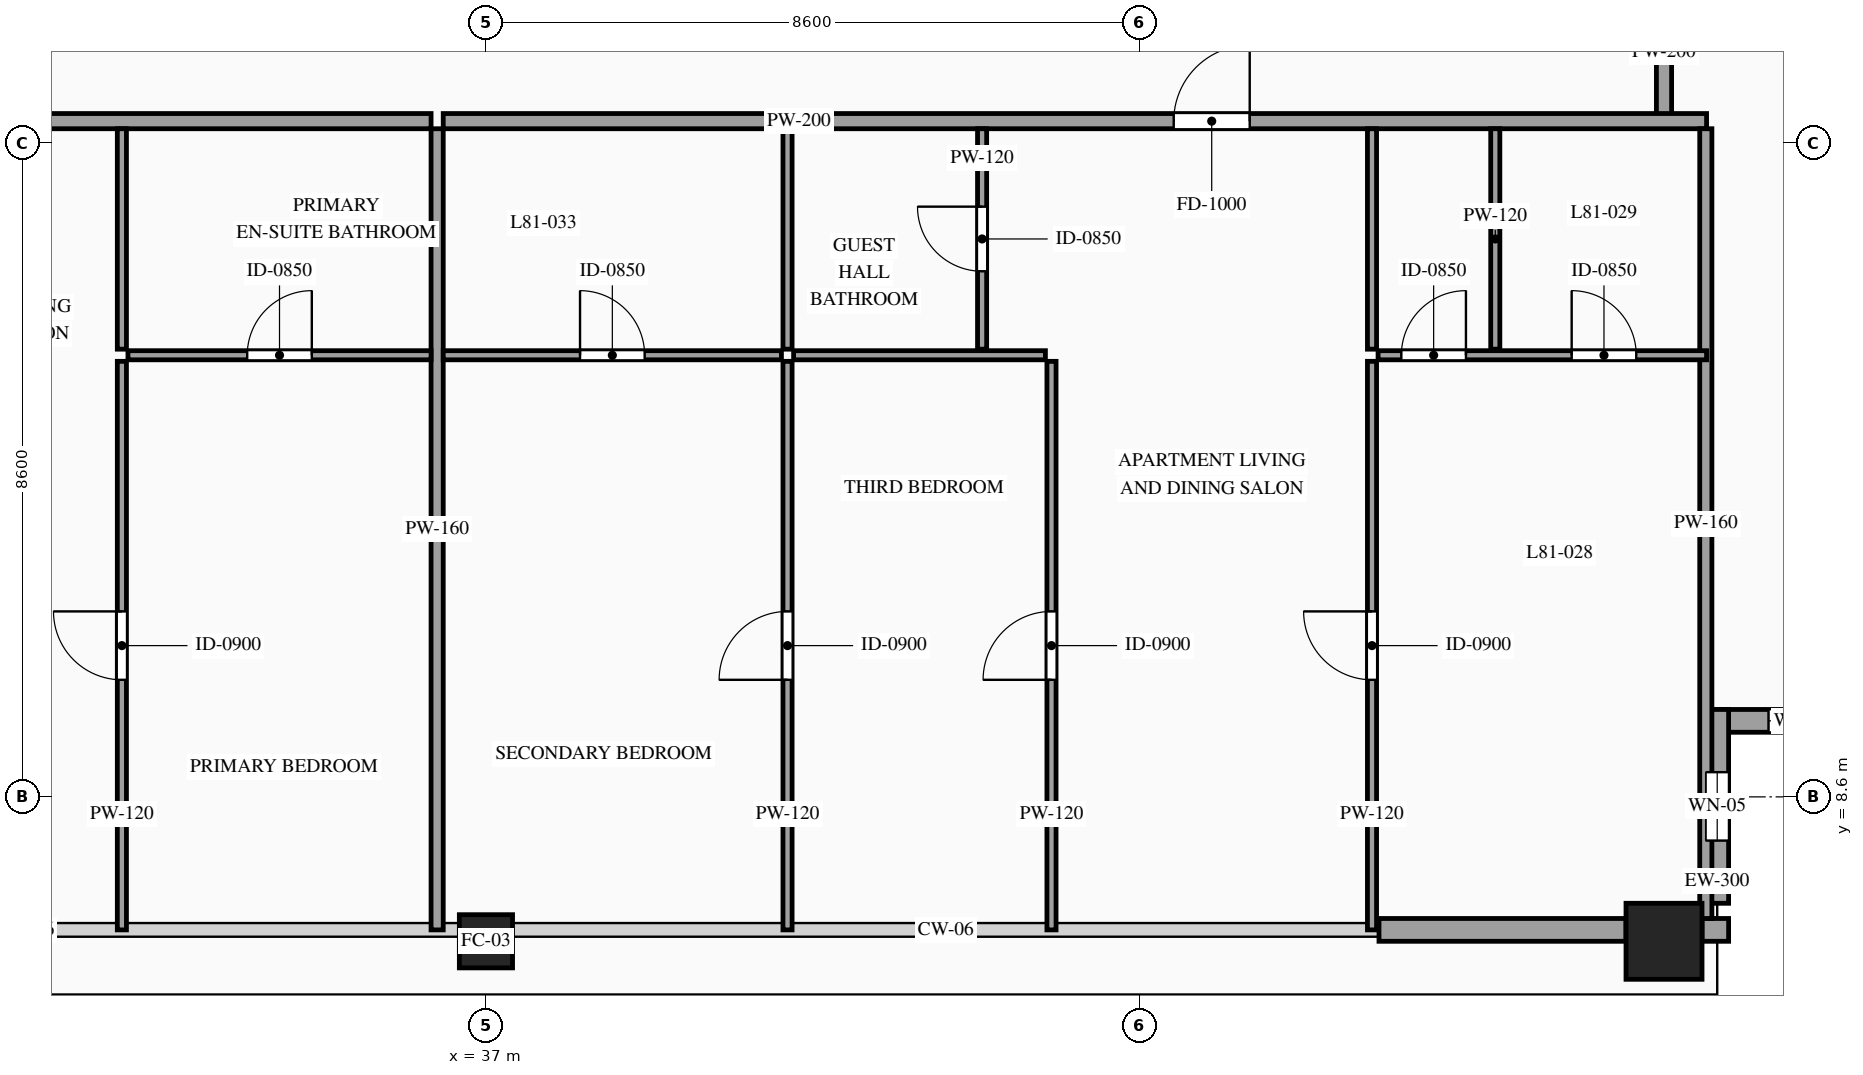
"""IFC4 building model, lengths in metres.
Left out: names, types, materials, properties, quantities, classifications, styles, units other than length and angle.
Written with IfcOpenShell. Run it as: python <this file> out.ifc"""

import sys

from ifc_helpers import new_model, si_unit, direction, frame, frame_2d, origin, origin_2d, place, context, subcontext, project, spatial, rectangle, hollow_rectangle, extrude, source, transform, mapped, element, fill, save


model = new_model("IFC4")
c1 = context("Model", 3, precision=1e-05, world=origin(), true_north=direction((0.0, 1.0)))
c2 = subcontext(c1, "Body", "Model", "MODEL_VIEW")
j1 = project(units=[si_unit("LENGTHUNIT", "METRE"), si_unit("PLANEANGLEUNIT", "RADIAN")], contexts=[c1])
p1 = place(None, origin())
s1 = spatial("IfcSite", under=j1, at=p1, CompositionType="ELEMENT")
p2 = place(p1, origin())
s2 = spatial("IfcBuilding", under=s1, at=p2, CompositionType="ELEMENT")
p3 = place(p2, frame((0.0, 0.0, 303.1)))
s3 = spatial("IfcBuildingStorey", under=s2, at=p3, CompositionType="ELEMENT", Elevation=303.1)
m1 = source(origin(), c2, "Body", "SweptSolid", [
    extrude(hollow_rectangle(XDim=0.7, YDim=0.7, WallThickness=0.032, at=origin_2d()), origin(), (0.0, 0.0, 1.0), 3.5),
])
p4 = place(p3, frame((37.0, 6.7, 0.0), z_axis=(0.0, 0.0, 1.0), x_axis=(1.0, 0.0, 0.0)))
e1 = element("IfcColumn", 1, at=p4, inside=s3, PredefinedType="COLUMN", context=c2, shape_type="MappedRepresentation", body=[
    mapped(m1, transform((0.0, 0.0, 0.0), scale=1.0)),
])
m2 = source(origin(), c2, "Body", "SweptSolid", [
    extrude(hollow_rectangle(XDim=1.0, YDim=1.0, WallThickness=0.048, at=origin_2d()), origin(), (0.0, 0.0, 1.0), 3.5),
])
p5 = place(p3, frame((52.5, 6.7, 0.0), z_axis=(0.0, 0.0, 1.0), x_axis=(1.0, 0.0, 0.0)))
e2 = element("IfcColumn", 2, at=p5, inside=s3, PredefinedType="COLUMN", context=c2, shape_type="MappedRepresentation", body=[
    mapped(m2, transform((0.0, 0.0, 0.0), scale=1.0)),
])
p6 = place(p3, frame((53.05, 9.6, 0.0), z_axis=(0.0, 0.0, 1.0), x_axis=(1.0, 0.0, 0.0)))
e3 = element("IfcWall", 3, at=p6, inside=s3, PredefinedType="SOLIDWALL", context=c2, shape_type="SweptSolid", body=[
    extrude(rectangle(XDim=2.55, YDim=0.3, at=frame_2d((1.275, 0.0))), origin(), (0.0, 0.0, 1.0), 3.22),
])
p7 = place(p6, frame((0.825, 0.0, 0.75)))
e4 = element("IfcOpeningElement", 4, at=p7, cuts=e3, PredefinedType="OPENING", context=c2, shape_type="SweptSolid", body=[
    extrude(rectangle(XDim=0.9, YDim=1.5, at=frame_2d((0.45, 0.75))), frame((0.0, 0.165, 0.0), z_axis=(0.0, -1.0, 0.0), x_axis=(1.0, 0.0, 0.0)), (0.0, 0.0, 1.0), 0.33),
])
p8 = place(p3, frame((53.2, 7.2, 0.0), z_axis=(0.0, 0.0, 1.0), x_axis=(0.0, 1.0, 0.0)))
e5 = element("IfcWall", 5, at=p8, inside=s3, PredefinedType="SOLIDWALL", context=c2, shape_type="SweptSolid", body=[
    extrude(rectangle(XDim=2.55, YDim=0.3, at=frame_2d((1.275, 0.0))), origin(), (0.0, 0.0, 1.0), 3.22),
])
p9 = place(p8, frame((0.825, 0.0, 0.75)))
e6 = element("IfcOpeningElement", 6, at=p9, cuts=e5, PredefinedType="OPENING", context=c2, shape_type="SweptSolid", body=[
    extrude(rectangle(XDim=0.9, YDim=1.5, at=frame_2d((0.45, 0.75))), frame((0.0, 0.165, 0.0), z_axis=(0.0, -1.0, 0.0), x_axis=(1.0, 0.0, 0.0)), (0.0, 0.0, 1.0), 0.33),
])
m3 = source(origin(), c2, "Body", "SweptSolid", [
    extrude(rectangle(XDim=0.35, YDim=0.3, at=frame_2d((0.175, 0.0))), origin(), (0.0, 0.0, 1.0), 3.22),
])
p10 = place(p3, frame((53.0, 6.85, 0.0), z_axis=(0.0, 0.0, 1.0), x_axis=(1.0, 0.0, 0.0)))
e7 = element("IfcWall", 7, at=p10, inside=s3, PredefinedType="SOLIDWALL", context=c2, shape_type="MappedRepresentation", body=[
    mapped(m3, transform((0.0, 0.0, 0.0), scale=1.0)),
])
m4 = source(origin(), c2, "Body", "SweptSolid", [
    extrude(rectangle(XDim=3.25, YDim=0.3, at=frame_2d((1.625, 0.0))), origin(), (0.0, 0.0, 1.0), 2.825),
])
p11 = place(p3, frame((48.75, 6.85, 0.0), z_axis=(0.0, 0.0, 1.0), x_axis=(1.0, 0.0, 0.0)))
e8 = element("IfcWall", 8, at=p11, inside=s3, PredefinedType="SOLIDWALL", context=c2, shape_type="MappedRepresentation", body=[
    mapped(m4, transform((0.0, 0.0, 0.0), scale=1.0)),
])
m5 = source(origin(), c2, "Body", "SweptSolid", [
    extrude(rectangle(XDim=1.7, YDim=0.2, at=frame_2d((0.85, 0.0))), origin(), (0.0, 0.0, 1.0), 3.22),
])
p12 = place(p3, frame((52.5, 17.55, 0.0), z_axis=(0.0, 0.0, 1.0), x_axis=(0.0, 1.0, 0.0)))
e9 = element("IfcWall", 9, at=p12, inside=s3, PredefinedType="PARTITIONING", context=c2, shape_type="MappedRepresentation", body=[
    mapped(m5, transform((0.0, 0.0, 0.0), scale=1.0)),
])
p13 = place(p3, frame((20.94, 17.49, 0.0), z_axis=(0.0, 0.0, 1.0), x_axis=(1.0, 0.0, 0.0)))
e10 = element("IfcWall", 10, at=p13, inside=s3, PredefinedType="PARTITIONING", context=c2, shape_type="SweptSolid", body=[
    extrude(rectangle(XDim=15.338, YDim=0.2, at=frame_2d((7.669, 0.0))), origin(), (0.0, 0.0, 1.0), 3.22),
])
p14 = place(p13, frame((8.927, 0.0, 0.0)))
e11 = element("IfcOpeningElement", 11, at=p14, cuts=e10, PredefinedType="OPENING", context=c2, shape_type="SweptSolid", body=[
    extrude(rectangle(XDim=1.0, YDim=2.2, at=frame_2d((0.5, 1.1))), frame((0.0, 0.115, 0.0), z_axis=(0.0, -1.0, 0.0), x_axis=(1.0, 0.0, 0.0)), (0.0, 0.0, 1.0), 0.23),
])
m6 = source(origin(), c2, "Body", "SweptSolid", [
    extrude(rectangle(XDim=10.54, YDim=0.16, at=frame_2d((5.27, 0.0))), origin(), (0.0, 0.0, 1.0), 3.22),
])
p15 = place(p3, frame((36.358, 6.85, 0.0), z_axis=(0.0, 0.0, 1.0), x_axis=(0.0, 1.0, 0.0)))
e12 = element("IfcWall", 12, at=p15, inside=s3, PredefinedType="PARTITIONING", context=c2, shape_type="MappedRepresentation", body=[
    mapped(m6, transform((0.0, 0.0, 0.0), scale=1.0)),
])
p16 = place(p3, frame((32.29, 14.41, 0.0), z_axis=(0.0, 0.0, 1.0), x_axis=(1.0, 0.0, 0.0)))
e13 = element("IfcWall", 13, at=p16, inside=s3, PredefinedType="PARTITIONING", context=c2, shape_type="SweptSolid", body=[
    extrude(rectangle(XDim=3.988, YDim=0.12, at=frame_2d((1.994, 0.0))), origin(), (0.0, 0.0, 1.0), 3.22),
])
p17 = place(p16, frame((1.569, 0.0, 0.0)))
e14 = element("IfcOpeningElement", 14, at=p17, cuts=e13, PredefinedType="OPENING", context=c2, shape_type="SweptSolid", body=[
    extrude(rectangle(XDim=0.85, YDim=2.1, at=frame_2d((0.425, 1.05))), frame((0.0, 0.075, 0.0), z_axis=(0.0, -1.0, 0.0), x_axis=(1.0, 0.0, 0.0)), (0.0, 0.0, 1.0), 0.15),
])
m7 = source(origin(), c2, "Body", "SweptSolid", [
    extrude(rectangle(XDim=2.9, YDim=0.12, at=frame_2d((1.45, 0.0))), origin(), (0.0, 0.0, 1.0), 3.22),
])
p18 = place(p3, frame((32.21, 14.49, 0.0), z_axis=(0.0, 0.0, 1.0), x_axis=(0.0, 1.0, 0.0)))
e15 = element("IfcWall", 15, at=p18, inside=s3, PredefinedType="PARTITIONING", context=c2, shape_type="MappedRepresentation", body=[
    mapped(m7, transform((0.0, 0.0, 0.0), scale=1.0)),
])
p19 = place(p3, frame((32.21, 6.85, 0.0), z_axis=(0.0, 0.0, 1.0), x_axis=(0.0, 1.0, 0.0)))
e16 = element("IfcWall", 16, at=p19, inside=s3, PredefinedType="PARTITIONING", context=c2, shape_type="SweptSolid", body=[
    extrude(rectangle(XDim=7.48, YDim=0.12, at=frame_2d((3.74, 0.0))), origin(), (0.0, 0.0, 1.0), 3.22),
])
p20 = place(p19, frame((3.29, 0.0, 0.0)))
e17 = element("IfcOpeningElement", 17, at=p20, cuts=e16, PredefinedType="OPENING", context=c2, shape_type="SweptSolid", body=[
    extrude(rectangle(XDim=0.9, YDim=2.15, at=frame_2d((0.45, 1.075))), frame((0.0, 0.075, 0.0), z_axis=(0.0, -1.0, 0.0), x_axis=(1.0, 0.0, 0.0)), (0.0, 0.0, 1.0), 0.15),
])
p21 = place(p3, frame((36.438, 17.49, 0.0), z_axis=(0.0, 0.0, 1.0), x_axis=(1.0, 0.0, 0.0)))
e18 = element("IfcWall", 18, at=p21, inside=s3, PredefinedType="PARTITIONING", context=c2, shape_type="SweptSolid", body=[
    extrude(rectangle(XDim=16.622, YDim=0.2, at=frame_2d((8.311, 0.0))), origin(), (0.0, 0.0, 1.0), 3.22),
])
p22 = place(p21, frame((9.611, 0.0, 0.0)))
e19 = element("IfcOpeningElement", 19, at=p22, cuts=e18, PredefinedType="OPENING", context=c2, shape_type="SweptSolid", body=[
    extrude(rectangle(XDim=1.0, YDim=2.2, at=frame_2d((0.5, 1.1))), frame((0.0, 0.115, 0.0), z_axis=(0.0, -1.0, 0.0), x_axis=(1.0, 0.0, 0.0)), (0.0, 0.0, 1.0), 0.23),
])
m8 = source(origin(), c2, "Body", "SweptSolid", [
    extrude(rectangle(XDim=10.39, YDim=0.16, at=frame_2d((5.195, 0.0))), origin(), (0.0, 0.0, 1.0), 3.22),
])
p23 = place(p3, frame((53.05, 7.0, 0.0), z_axis=(0.0, 0.0, 1.0), x_axis=(0.0, 1.0, 0.0)))
e20 = element("IfcWall", 20, at=p23, inside=s3, PredefinedType="PARTITIONING", context=c2, shape_type="MappedRepresentation", body=[
    mapped(m8, transform((0.0, 0.0, 0.0), scale=1.0)),
])
p24 = place(p3, frame((36.438, 14.41, 0.0), z_axis=(0.0, 0.0, 1.0), x_axis=(1.0, 0.0, 0.0)))
e21 = element("IfcWall", 21, at=p24, inside=s3, PredefinedType="PARTITIONING", context=c2, shape_type="SweptSolid", body=[
    extrude(rectangle(XDim=4.45, YDim=0.12, at=frame_2d((2.225, 0.0))), origin(), (0.0, 0.0, 1.0), 3.22),
])
p25 = place(p24, frame((1.8, 0.0, 0.0)))
e22 = element("IfcOpeningElement", 22, at=p25, cuts=e21, PredefinedType="OPENING", context=c2, shape_type="SweptSolid", body=[
    extrude(rectangle(XDim=0.85, YDim=2.1, at=frame_2d((0.425, 1.05))), frame((0.0, 0.075, 0.0), z_axis=(0.0, -1.0, 0.0), x_axis=(1.0, 0.0, 0.0)), (0.0, 0.0, 1.0), 0.15),
])
p26 = place(p3, frame((40.968, 14.49, 0.0), z_axis=(0.0, 0.0, 1.0), x_axis=(0.0, 1.0, 0.0)))
e23 = element("IfcWall", 23, at=p26, inside=s3, PredefinedType="PARTITIONING", context=c2, shape_type="MappedRepresentation", body=[
    mapped(m7, transform((0.0, 0.0, 0.0), scale=1.0)),
])
p27 = place(p3, frame((43.528, 14.49, 0.0), z_axis=(0.0, 0.0, 1.0), x_axis=(0.0, 1.0, 0.0)))
e24 = element("IfcWall", 24, at=p27, inside=s3, PredefinedType="PARTITIONING", context=c2, shape_type="SweptSolid", body=[
    extrude(rectangle(XDim=2.9, YDim=0.12, at=frame_2d((1.45, 0.0))), origin(), (0.0, 0.0, 1.0), 3.22),
])
p28 = place(p27, frame((1.025, 0.0, 0.0)))
e25 = element("IfcOpeningElement", 25, at=p28, cuts=e24, PredefinedType="OPENING", context=c2, shape_type="SweptSolid", body=[
    extrude(rectangle(XDim=0.85, YDim=2.1, at=frame_2d((0.425, 1.05))), frame((0.0, 0.075, 0.0), z_axis=(0.0, -1.0, 0.0), x_axis=(1.0, 0.0, 0.0)), (0.0, 0.0, 1.0), 0.15),
])
m9 = source(origin(), c2, "Body", "SweptSolid", [
    extrude(rectangle(XDim=2.9, YDim=0.12, at=frame_2d((1.45, 0.0))), origin(), (0.0, 0.0, 1.0), 2.765),
])
p29 = place(p3, frame((50.28, 14.49, 0.0), z_axis=(0.0, 0.0, 1.0), x_axis=(0.0, 1.0, 0.0)))
e26 = element("IfcWall", 26, at=p29, inside=s3, PredefinedType="PARTITIONING", context=c2, shape_type="MappedRepresentation", body=[
    mapped(m9, transform((0.0, 0.0, 0.0), scale=1.0)),
])
p30 = place(p3, frame((48.658, 14.49, 0.0), z_axis=(0.0, 0.0, 1.0), x_axis=(0.0, 1.0, 0.0)))
e27 = element("IfcWall", 27, at=p30, inside=s3, PredefinedType="PARTITIONING", context=c2, shape_type="MappedRepresentation", body=[
    mapped(m7, transform((0.0, 0.0, 0.0), scale=1.0)),
])
p31 = place(p3, frame((40.968, 6.85, 0.0), z_axis=(0.0, 0.0, 1.0), x_axis=(0.0, 1.0, 0.0)))
e28 = element("IfcWall", 28, at=p31, inside=s3, PredefinedType="PARTITIONING", context=c2, shape_type="SweptSolid", body=[
    extrude(rectangle(XDim=7.48, YDim=0.12, at=frame_2d((3.74, 0.0))), origin(), (0.0, 0.0, 1.0), 3.22),
])
p32 = place(p31, frame((3.29, 0.0, 0.0)))
e29 = element("IfcOpeningElement", 29, at=p32, cuts=e28, PredefinedType="OPENING", context=c2, shape_type="SweptSolid", body=[
    extrude(rectangle(XDim=0.9, YDim=2.15, at=frame_2d((0.45, 1.075))), frame((0.0, 0.075, 0.0), z_axis=(0.0, -1.0, 0.0), x_axis=(1.0, 0.0, 0.0)), (0.0, 0.0, 1.0), 0.15),
])
p33 = place(p3, frame((48.738, 14.41, 0.0), z_axis=(0.0, 0.0, 1.0), x_axis=(1.0, 0.0, 0.0)))
e30 = element("IfcWall", 30, at=p33, inside=s3, PredefinedType="PARTITIONING", context=c2, shape_type="SweptSolid", body=[
    extrude(rectangle(XDim=4.322, YDim=0.12, at=frame_2d((2.161, 0.0))), origin(), (0.0, 0.0, 1.0), 3.22),
])
p34 = place(p33, frame((2.547, 0.0, 0.0)))
e31 = element("IfcOpeningElement", 31, at=p34, cuts=e30, PredefinedType="OPENING", context=c2, shape_type="SweptSolid", body=[
    extrude(rectangle(XDim=0.85, YDim=2.1, at=frame_2d((0.425, 1.05))), frame((0.0, 0.075, 0.0), z_axis=(0.0, -1.0, 0.0), x_axis=(1.0, 0.0, 0.0)), (0.0, 0.0, 1.0), 0.15),
])
p35 = place(p33, frame((0.306, 0.0, 0.0)))
e32 = element("IfcOpeningElement", 32, at=p35, cuts=e30, PredefinedType="OPENING", context=c2, shape_type="SweptSolid", body=[
    extrude(rectangle(XDim=0.85, YDim=2.1, at=frame_2d((0.425, 1.05))), frame((0.0, 0.075, 0.0), z_axis=(0.0, -1.0, 0.0), x_axis=(1.0, 0.0, 0.0)), (0.0, 0.0, 1.0), 0.15),
])
p36 = place(p3, frame((48.658, 6.85, 0.0), z_axis=(0.0, 0.0, 1.0), x_axis=(0.0, 1.0, 0.0)))
e33 = element("IfcWall", 33, at=p36, inside=s3, PredefinedType="PARTITIONING", context=c2, shape_type="SweptSolid", body=[
    extrude(rectangle(XDim=7.48, YDim=0.12, at=frame_2d((3.74, 0.0))), origin(), (0.0, 0.0, 1.0), 3.22),
])
p37 = place(p36, frame((3.29, 0.0, 0.0)))
e34 = element("IfcOpeningElement", 34, at=p37, cuts=e33, PredefinedType="OPENING", context=c2, shape_type="SweptSolid", body=[
    extrude(rectangle(XDim=0.9, YDim=2.15, at=frame_2d((0.45, 1.075))), frame((0.0, 0.075, 0.0), z_axis=(0.0, -1.0, 0.0), x_axis=(1.0, 0.0, 0.0)), (0.0, 0.0, 1.0), 0.15),
])
m10 = source(origin(), c2, "Body", "SweptSolid", [
    extrude(rectangle(XDim=3.313, YDim=0.12, at=frame_2d((1.656, 0.0))), origin(), (0.0, 0.0, 1.0), 3.22),
])
p38 = place(p3, frame((41.048, 14.41, 0.0), z_axis=(0.0, 0.0, 1.0), x_axis=(1.0, 0.0, 0.0)))
e35 = element("IfcWall", 35, at=p38, inside=s3, PredefinedType="PARTITIONING", context=c2, shape_type="MappedRepresentation", body=[
    mapped(m10, transform((0.0, 0.0, 0.0), scale=1.0)),
])
p39 = place(p3, frame((44.441, 6.85, 0.0), z_axis=(0.0, 0.0, 1.0), x_axis=(0.0, 1.0, 0.0)))
e36 = element("IfcWall", 36, at=p39, inside=s3, PredefinedType="PARTITIONING", context=c2, shape_type="SweptSolid", body=[
    extrude(rectangle(XDim=7.48, YDim=0.12, at=frame_2d((3.74, 0.0))), origin(), (0.0, 0.0, 1.0), 3.22),
])
p40 = place(p39, frame((3.29, 0.0, 0.0)))
e37 = element("IfcOpeningElement", 37, at=p40, cuts=e36, PredefinedType="OPENING", context=c2, shape_type="SweptSolid", body=[
    extrude(rectangle(XDim=0.9, YDim=2.15, at=frame_2d((0.45, 1.075))), frame((0.0, 0.075, 0.0), z_axis=(0.0, -1.0, 0.0), x_axis=(1.0, 0.0, 0.0)), (0.0, 0.0, 1.0), 0.15),
])
m11 = source(origin(), c2, "Body", "SweptSolid", [
    extrude(rectangle(XDim=0.9, YDim=1.5, at=frame_2d((0.45, 0.75))), frame((0.0, 0.03, 0.0), z_axis=(0.0, -1.0, 0.0), x_axis=(1.0, 0.0, 0.0)), (0.0, 0.0, 1.0), 0.06),
])
p41 = place(p7, origin())
e38 = element("IfcWindow", 38, at=p41, inside=s3, PartitioningType="SINGLE_PANEL", PredefinedType="WINDOW", context=c2, shape_type="MappedRepresentation", body=[
    mapped(m11, transform((0.0, 0.0, 0.0), scale=1.0)),
])
fill(e4, e38)
p42 = place(p9, origin())
e39 = element("IfcWindow", 39, at=p42, inside=s3, PartitioningType="SINGLE_PANEL", PredefinedType="WINDOW", context=c2, shape_type="MappedRepresentation", body=[
    mapped(m11, transform((0.0, 0.0, 0.0), scale=1.0)),
])
fill(e6, e39)
m12 = source(origin(), c2, "Body", "SweptSolid", [
    extrude(rectangle(XDim=0.85, YDim=2.1, at=frame_2d((0.425, 1.05))), frame((0.0, 0.025, 0.0), z_axis=(0.0, -1.0, 0.0), x_axis=(1.0, 0.0, 0.0)), (0.0, 0.0, 1.0), 0.05),
])
p43 = place(p17, origin())
e40 = element("IfcDoor", 40, at=p43, inside=s3, OperationType="SINGLE_SWING_RIGHT", PredefinedType="DOOR", context=c2, shape_type="MappedRepresentation", body=[
    mapped(m12, transform((0.0, 0.0, 0.0), scale=1.0)),
])
fill(e14, e40)
m13 = source(origin(), c2, "Body", "SweptSolid", [
    extrude(rectangle(XDim=0.9, YDim=2.15, at=frame_2d((0.45, 1.075))), frame((0.0, 0.025, 0.0), z_axis=(0.0, -1.0, 0.0), x_axis=(1.0, 0.0, 0.0)), (0.0, 0.0, 1.0), 0.05),
])
p44 = place(p20, origin())
e41 = element("IfcDoor", 41, at=p44, inside=s3, OperationType="SINGLE_SWING_RIGHT", PredefinedType="DOOR", context=c2, shape_type="MappedRepresentation", body=[
    mapped(m13, transform((0.0, 0.0, 0.0), scale=1.0)),
])
fill(e17, e41)
m14 = source(origin(), c2, "Body", "SweptSolid", [
    extrude(rectangle(XDim=1.0, YDim=2.2, at=frame_2d((0.5, 1.1))), frame((0.0, 0.025, 0.0), z_axis=(0.0, -1.0, 0.0), x_axis=(1.0, 0.0, 0.0)), (0.0, 0.0, 1.0), 0.05),
])
p45 = place(p22, origin())
e42 = element("IfcDoor", 42, at=p45, inside=s3, OperationType="SINGLE_SWING_RIGHT", PredefinedType="DOOR", context=c2, shape_type="MappedRepresentation", body=[
    mapped(m14, transform((0.0, 0.0, 0.0), scale=1.0)),
])
fill(e19, e42)
p46 = place(p25, origin())
e43 = element("IfcDoor", 43, at=p46, inside=s3, OperationType="SINGLE_SWING_LEFT", PredefinedType="DOOR", context=c2, shape_type="MappedRepresentation", body=[
    mapped(m12, transform((0.0, 0.0, 0.0), scale=1.0)),
])
fill(e22, e43)
p47 = place(p28, origin())
e44 = element("IfcDoor", 44, at=p47, inside=s3, OperationType="SINGLE_SWING_RIGHT", PredefinedType="DOOR", context=c2, shape_type="MappedRepresentation", body=[
    mapped(m12, transform((0.0, 0.0, 0.0), scale=1.0)),
])
fill(e25, e44)
p48 = place(p34, origin())
e45 = element("IfcDoor", 45, at=p48, inside=s3, OperationType="SINGLE_SWING_LEFT", PredefinedType="DOOR", context=c2, shape_type="MappedRepresentation", body=[
    mapped(m12, transform((0.0, 0.0, 0.0), scale=1.0)),
])
fill(e31, e45)
p49 = place(p35, origin())
e46 = element("IfcDoor", 46, at=p49, inside=s3, OperationType="SINGLE_SWING_RIGHT", PredefinedType="DOOR", context=c2, shape_type="MappedRepresentation", body=[
    mapped(m12, transform((0.0, 0.0, 0.0), scale=1.0)),
])
fill(e32, e46)
p50 = place(p32, origin())
e47 = element("IfcDoor", 47, at=p50, inside=s3, OperationType="SINGLE_SWING_LEFT", PredefinedType="DOOR", context=c2, shape_type="MappedRepresentation", body=[
    mapped(m13, transform((0.0, 0.0, 0.0), scale=1.0)),
])
fill(e29, e47)
p51 = place(p37, origin())
e48 = element("IfcDoor", 48, at=p51, inside=s3, OperationType="SINGLE_SWING_RIGHT", PredefinedType="DOOR", context=c2, shape_type="MappedRepresentation", body=[
    mapped(m13, transform((0.0, 0.0, 0.0), scale=1.0)),
])
fill(e34, e48)
p52 = place(p40, origin())
e49 = element("IfcDoor", 49, at=p52, inside=s3, OperationType="SINGLE_SWING_LEFT", PredefinedType="DOOR", context=c2, shape_type="MappedRepresentation", body=[
    mapped(m13, transform((0.0, 0.0, 0.0), scale=1.0)),
])
fill(e37, e49)
save(model, sys.argv[1])
